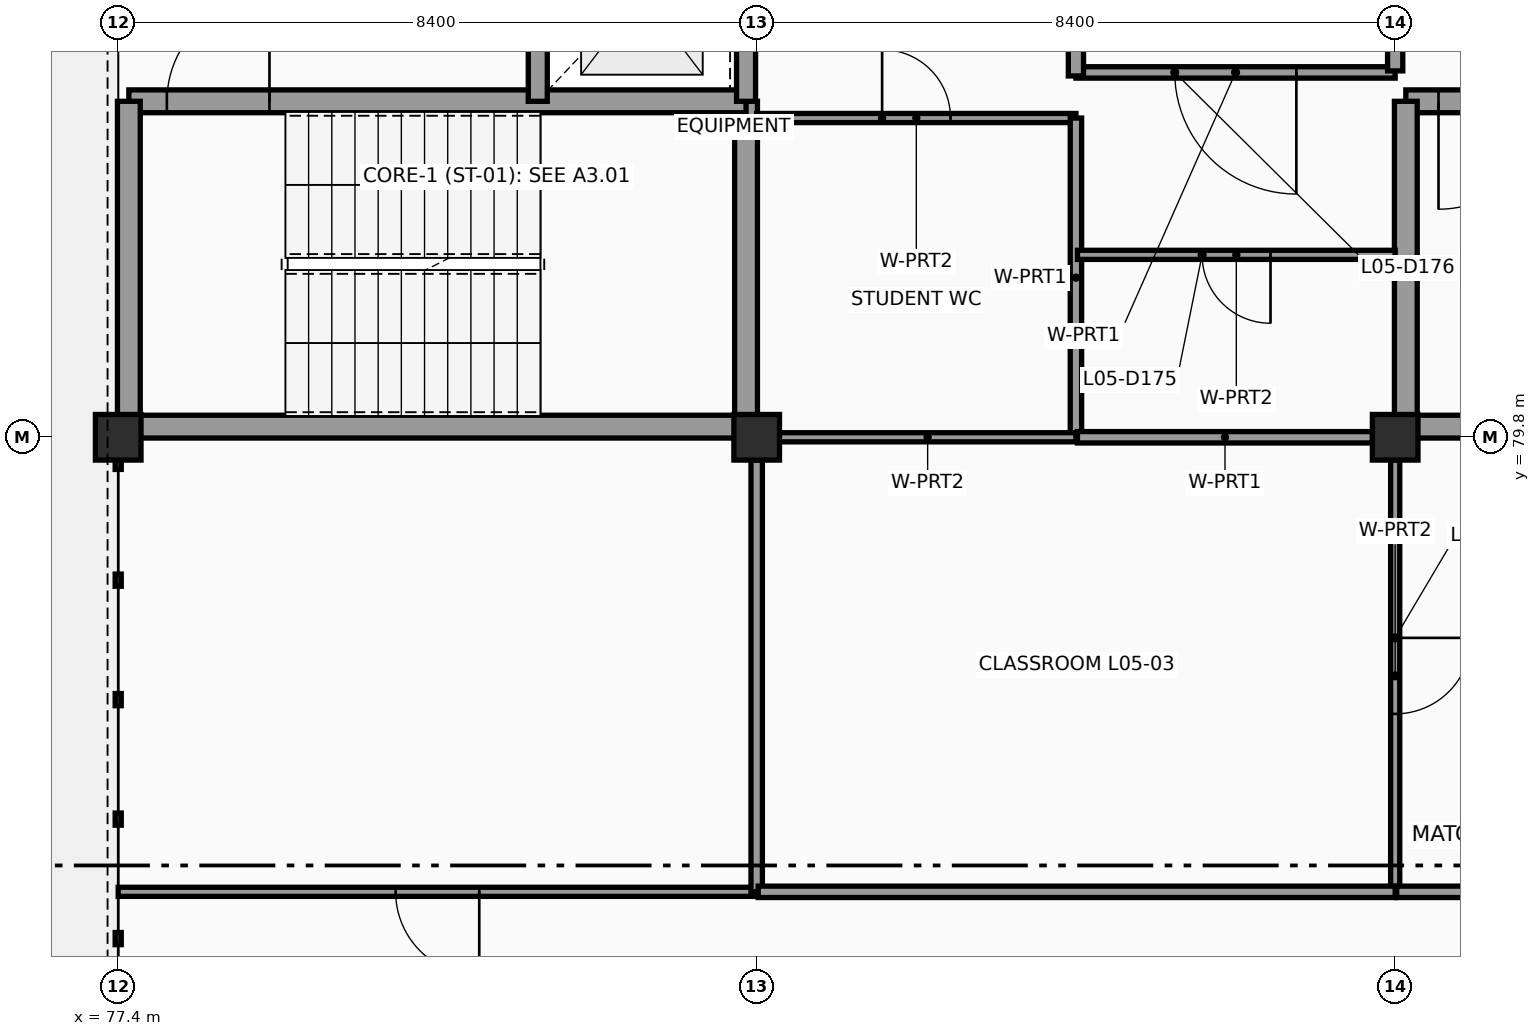
"""IFC4 building model, lengths in metres.
Left out: names, types, materials, properties, quantities, classifications, styles, units other than length and angle.
Written with IfcOpenShell. Run it as: python <this file> out.ifc"""

import sys

from ifc_helpers import new_model, si_unit, direction, frame, frame_2d, origin, origin_2d, place, context, subcontext, project, spatial, rectangle, extrude, element, fill, save


model = new_model("IFC4")
c1 = context("Model", 3, precision=1e-05, world=origin(), true_north=direction((0.0, 1.0)))
c2 = subcontext(c1, "Body", "Model", "MODEL_VIEW")
j1 = project(units=[si_unit("LENGTHUNIT", "METRE"), si_unit("PLANEANGLEUNIT", "RADIAN")], contexts=[c1])
p1 = place(None, origin())
s1 = spatial("IfcSite", under=j1, at=p1, CompositionType="ELEMENT")
p2 = place(p1, origin())
s2 = spatial("IfcBuilding", under=s1, at=p2, CompositionType="ELEMENT")
p3 = place(p2, frame((0.0, 0.0, 18.6)))
s3 = spatial("IfcBuildingStorey", under=s2, at=p3, CompositionType="ELEMENT", Elevation=18.6)
for number, where, z_axis, x_axis in (
    (1, (77.4, 79.8, 0.0), (0.0, 0.0, 1.0), (1.0, 0.0, 0.0)),
    (2, (85.8, 79.8, 0.0), (0.0, 0.0, 1.0), (1.0, 0.0, 0.0)),
    (3, (94.2, 79.8, 0.0), (0.0, 0.0, 1.0), (1.0, 0.0, 0.0)),
):
    element("IfcColumn", number, at=place(p3, frame(where, z_axis=z_axis, x_axis=x_axis)), inside=s3, PredefinedType="COLUMN", context=c2, shape_type="SweptSolid", body=[
        extrude(rectangle(XDim=0.6, YDim=0.6, at=origin_2d()), origin(), (0.0, 0.0, 1.0), 3.6),
    ])
p4 = place(p3, frame((77.54, 79.94, 0.0), z_axis=(0.0, 0.0, 1.0), x_axis=(1.0, 0.0, 0.0)))
e4 = element("IfcWall", 4, at=p4, inside=s3, PredefinedType="SHEAR", context=c2, shape_type="SweptSolid", body=[
    extrude(rectangle(XDim=8.12, YDim=0.3, at=frame_2d((4.06, 0.0))), origin(), (0.0, 0.0, 1.0), 3.6),
])
p5 = place(p3, frame((85.66, 79.94, 0.0), z_axis=(0.0, 0.0, 1.0), x_axis=(0.0, 1.0, 0.0)))
e5 = element("IfcWall", 5, at=p5, inside=s3, PredefinedType="SHEAR", context=c2, shape_type="SweptSolid", body=[
    extrude(rectangle(XDim=4.28, YDim=0.3, at=frame_2d((2.14, 0.0))), origin(), (0.0, 0.0, 1.0), 3.6),
])
p6 = place(p3, frame((85.66, 84.22, 0.0), z_axis=(0.0, 0.0, 1.0), x_axis=(-1.0, 0.0, 0.0)))
e6 = element("IfcWall", 6, at=p6, inside=s3, PredefinedType="SHEAR", context=c2, shape_type="SweptSolid", body=[
    extrude(rectangle(XDim=8.12, YDim=0.3, at=frame_2d((4.06, 0.0))), origin(), (0.0, 0.0, 1.0), 3.6),
])
p7 = place(p6, frame((6.27, 0.0, 0.0)))
e7 = element("IfcOpeningElement", 7, at=p7, cuts=e6, PredefinedType="OPENING", context=c2, shape_type="SweptSolid", body=[
    extrude(rectangle(XDim=1.35, YDim=2.15, at=frame_2d((0.675, 1.075))), frame((0.0, 0.16, 0.0), z_axis=(0.0, -1.0, 0.0), x_axis=(1.0, 0.0, 0.0)), (0.0, 0.0, 1.0), 0.32),
])
p8 = place(p3, frame((77.54, 84.22, 0.0), z_axis=(0.0, 0.0, 1.0), x_axis=(0.0, -1.0, 0.0)))
e8 = element("IfcWall", 8, at=p8, inside=s3, PredefinedType="SHEAR", context=c2, shape_type="SweptSolid", body=[
    extrude(rectangle(XDim=4.28, YDim=0.3, at=frame_2d((2.14, 0.0))), origin(), (0.0, 0.0, 1.0), 3.6),
])
p9 = place(p3, frame((82.92, 87.02, 0.0), z_axis=(0.0, 0.0, 1.0), x_axis=(0.0, -1.0, 0.0)))
e9 = element("IfcWall", 9, at=p9, inside=s3, PredefinedType="SHEAR", context=c2, shape_type="SweptSolid", body=[
    extrude(rectangle(XDim=2.8, YDim=0.25, at=frame_2d((1.4, 0.0))), origin(), (0.0, 0.0, 1.0), 3.6),
])
p10 = place(p9, frame((0.85, 0.0, 0.0)))
e10 = element("IfcOpeningElement", 10, at=p10, cuts=e9, PredefinedType="OPENING", context=c2, shape_type="SweptSolid", body=[
    extrude(rectangle(XDim=1.1, YDim=2.15, at=frame_2d((0.55, 1.075))), frame((0.0, 0.135, 0.0), z_axis=(0.0, -1.0, 0.0), x_axis=(1.0, 0.0, 0.0)), (0.0, 0.0, 1.0), 0.27),
])
p11 = place(p3, frame((85.66, 84.22, 0.0), z_axis=(0.0, 0.0, 1.0), x_axis=(0.0, 1.0, 0.0)))
e11 = element("IfcWall", 11, at=p11, inside=s3, PredefinedType="SHEAR", context=c2, shape_type="SweptSolid", body=[
    extrude(rectangle(XDim=2.8, YDim=0.25, at=frame_2d((1.4, 0.0))), origin(), (0.0, 0.0, 1.0), 3.6),
])
p12 = place(p3, frame((94.34, 79.94, 0.0), z_axis=(0.0, 0.0, 1.0), x_axis=(1.0, 0.0, 0.0)))
e12 = element("IfcWall", 12, at=p12, inside=s3, PredefinedType="SHEAR", context=c2, shape_type="SweptSolid", body=[
    extrude(rectangle(XDim=8.12, YDim=0.3, at=frame_2d((4.06, 0.0))), origin(), (0.0, 0.0, 1.0), 3.6),
])
p13 = place(p3, frame((102.46, 84.22, 0.0), z_axis=(0.0, 0.0, 1.0), x_axis=(-1.0, 0.0, 0.0)))
e13 = element("IfcWall", 13, at=p13, inside=s3, PredefinedType="SHEAR", context=c2, shape_type="SweptSolid", body=[
    extrude(rectangle(XDim=8.12, YDim=0.3, at=frame_2d((4.06, 0.0))), origin(), (0.0, 0.0, 1.0), 3.6),
])
p14 = place(p13, frame((6.27, 0.0, 0.0)))
e14 = element("IfcOpeningElement", 14, at=p14, cuts=e13, PredefinedType="OPENING", context=c2, shape_type="SweptSolid", body=[
    extrude(rectangle(XDim=1.42, YDim=2.15, at=frame_2d((0.71, 1.075))), frame((0.0, 0.16, 0.0), z_axis=(0.0, -1.0, 0.0), x_axis=(1.0, 0.0, 0.0)), (0.0, 0.0, 1.0), 0.32),
])
p15 = place(p3, frame((94.34, 84.22, 0.0), z_axis=(0.0, 0.0, 1.0), x_axis=(0.0, -1.0, 0.0)))
e15 = element("IfcWall", 15, at=p15, inside=s3, PredefinedType="SHEAR", context=c2, shape_type="SweptSolid", body=[
    extrude(rectangle(XDim=4.28, YDim=0.3, at=frame_2d((2.14, 0.0))), origin(), (0.0, 0.0, 1.0), 3.6),
])
p16 = place(p3, frame((85.8, 84.0, 0.0), z_axis=(0.0, 0.0, 1.0), x_axis=(1.0, 0.0, 0.0)))
e16 = element("IfcWall", 16, at=p16, inside=s3, PredefinedType="PARTITIONING", context=c2, shape_type="SweptSolid", body=[
    extrude(rectangle(XDim=4.2, YDim=0.12, at=frame_2d((2.1, 0.0))), origin(), (0.0, 0.0, 1.0), 2.95),
])
p17 = place(p16, frame((1.65, 0.0, 0.0)))
e17 = element("IfcOpeningElement", 17, at=p17, cuts=e16, PredefinedType="OPENING", context=c2, shape_type="SweptSolid", body=[
    extrude(rectangle(XDim=0.9, YDim=2.1, at=frame_2d((0.45, 1.05))), frame((0.0, 0.07, 0.0), z_axis=(0.0, -1.0, 0.0), x_axis=(1.0, 0.0, 0.0)), (0.0, 0.0, 1.0), 0.14),
])
p18 = place(p3, frame((90.0, 84.0, 0.0), z_axis=(0.0, 0.0, 1.0), x_axis=(0.0, -1.0, 0.0)))
e18 = element("IfcWall", 18, at=p18, inside=s3, PredefinedType="PARTITIONING", context=c2, shape_type="SweptSolid", body=[
    extrude(rectangle(XDim=4.2, YDim=0.15, at=frame_2d((2.1, 0.0))), origin(), (0.0, 0.0, 1.0), 2.55),
])
p19 = place(p3, frame((90.0, 79.8, 0.0), z_axis=(0.0, 0.0, 1.0), x_axis=(-1.0, 0.0, 0.0)))
e19 = element("IfcWall", 19, at=p19, inside=s3, PredefinedType="PARTITIONING", context=c2, shape_type="SweptSolid", body=[
    extrude(rectangle(XDim=3.902, YDim=0.12, at=frame_2d((1.951, 0.0))), origin(), (0.0, 0.0, 1.0), 2.55),
])
p20 = place(p3, frame((93.902, 79.8, 0.0), z_axis=(0.0, 0.0, 1.0), x_axis=(-1.0, 0.0, 0.0)))
e20 = element("IfcWall", 20, at=p20, inside=s3, PredefinedType="PARTITIONING", context=c2, shape_type="SweptSolid", body=[
    extrude(rectangle(XDim=3.882, YDim=0.15, at=frame_2d((1.941, 0.0))), origin(), (0.0, 0.0, 1.0), 2.55),
])
p21 = place(p3, frame((90.02, 82.2, 0.0), z_axis=(0.0, 0.0, 1.0), x_axis=(1.0, 0.0, 0.0)))
e21 = element("IfcWall", 21, at=p21, inside=s3, PredefinedType="PARTITIONING", context=c2, shape_type="SweptSolid", body=[
    extrude(rectangle(XDim=4.18, YDim=0.12, at=frame_2d((2.09, 0.0))), origin(), (0.0, 0.0, 1.0), 2.99),
])
p22 = place(p21, frame((1.64, 0.0, 0.0)))
e22 = element("IfcOpeningElement", 22, at=p22, cuts=e21, PredefinedType="OPENING", context=c2, shape_type="SweptSolid", body=[
    extrude(rectangle(XDim=0.9, YDim=2.1, at=frame_2d((0.45, 1.05))), frame((0.0, 0.07, 0.0), z_axis=(0.0, -1.0, 0.0), x_axis=(1.0, 0.0, 0.0)), (0.0, 0.0, 1.0), 0.14),
])
p23 = place(p3, frame((90.0, 84.6, 0.0), z_axis=(0.0, 0.0, 1.0), x_axis=(1.0, 0.0, 0.0)))
e23 = element("IfcWall", 23, at=p23, inside=s3, PredefinedType="PARTITIONING", context=c2, shape_type="SweptSolid", body=[
    extrude(rectangle(XDim=4.2, YDim=0.15, at=frame_2d((2.1, 0.0))), origin(), (0.0, 0.0, 1.0), 2.99),
])
p24 = place(p23, frame((1.3, 0.0, 0.0)))
e24 = element("IfcOpeningElement", 24, at=p24, cuts=e23, PredefinedType="OPENING", context=c2, shape_type="SweptSolid", body=[
    extrude(rectangle(XDim=1.6, YDim=2.2, at=frame_2d((0.8, 1.1))), frame((0.0, 0.085, 0.0), z_axis=(0.0, -1.0, 0.0), x_axis=(1.0, 0.0, 0.0)), (0.0, 0.0, 1.0), 0.17),
])
p25 = place(p3, frame((90.0, 88.2, 0.0), z_axis=(0.0, 0.0, 1.0), x_axis=(0.0, -1.0, 0.0)))
e25 = element("IfcWall", 25, at=p25, inside=s3, PredefinedType="PARTITIONING", context=c2, shape_type="SweptSolid", body=[
    extrude(rectangle(XDim=3.646, YDim=0.2, at=frame_2d((1.823, 0.0))), origin(), (0.0, 0.0, 1.0), 2.9),
])
p26 = place(p3, frame((94.2, 87.902, 0.0), z_axis=(0.0, 0.0, 1.0), x_axis=(0.0, -1.0, 0.0)))
e26 = element("IfcWall", 26, at=p26, inside=s3, PredefinedType="PARTITIONING", context=c2, shape_type="SweptSolid", body=[
    extrude(rectangle(XDim=3.282, YDim=0.2, at=frame_2d((1.641, 0.0))), origin(), (0.0, 0.0, 1.0), 2.99),
])
p27 = place(p26, frame((0.691, 0.0, 0.0)))
e27 = element("IfcOpeningElement", 27, at=p27, cuts=e26, PredefinedType="OPENING", context=c2, shape_type="SweptSolid", body=[
    extrude(rectangle(XDim=1.9, YDim=2.3, at=frame_2d((0.95, 1.15))), frame((0.0, 0.11, 0.0), z_axis=(0.0, -1.0, 0.0), x_axis=(1.0, 0.0, 0.0)), (0.0, 0.0, 1.0), 0.22),
])
p28 = place(p3, frame((85.8, 73.82, 0.0), z_axis=(0.0, 0.0, 1.0), x_axis=(-1.0, 0.0, 0.0)))
e28 = element("IfcWall", 28, at=p28, inside=s3, PredefinedType="PARTITIONING", context=c2, shape_type="SweptSolid", body=[
    extrude(rectangle(XDim=8.4, YDim=0.12, at=frame_2d((4.2, 0.0))), origin(), (0.0, 0.0, 1.0), 2.58),
])
p29 = place(p28, frame((3.65, 0.0, 0.0)))
e29 = element("IfcOpeningElement", 29, at=p29, cuts=e28, PredefinedType="OPENING", context=c2, shape_type="SweptSolid", body=[
    extrude(rectangle(XDim=1.1, YDim=2.1, at=frame_2d((0.55, 1.05))), frame((0.0, 0.07, 0.0), z_axis=(0.0, -1.0, 0.0), x_axis=(1.0, 0.0, 0.0)), (0.0, 0.0, 1.0), 0.14),
])
p30 = place(p3, frame((85.8, 79.502, 0.0), z_axis=(0.0, 0.0, 1.0), x_axis=(0.0, -1.0, 0.0)))
e30 = element("IfcWall", 30, at=p30, inside=s3, PredefinedType="PARTITIONING", context=c2, shape_type="SweptSolid", body=[
    extrude(rectangle(XDim=5.682, YDim=0.15, at=frame_2d((2.841, 0.0))), origin(), (0.0, 0.0, 1.0), 2.88),
])
p31 = place(p3, frame((94.2, 79.502, 0.0), z_axis=(0.0, 0.0, 1.0), x_axis=(0.0, -1.0, 0.0)))
e31 = element("IfcWall", 31, at=p31, inside=s3, PredefinedType="PARTITIONING", context=c2, shape_type="SweptSolid", body=[
    extrude(rectangle(XDim=5.682, YDim=0.12, at=frame_2d((2.841, 0.0))), origin(), (0.0, 0.0, 1.0), 2.92),
])
p32 = place(p31, frame((2.341, 0.0, 0.0)))
e32 = element("IfcOpeningElement", 32, at=p32, cuts=e31, PredefinedType="OPENING", context=c2, shape_type="SweptSolid", body=[
    extrude(rectangle(XDim=1.0, YDim=2.1, at=frame_2d((0.5, 1.05))), frame((0.0, 0.07, 0.0), z_axis=(0.0, -1.0, 0.0), x_axis=(1.0, 0.0, 0.0)), (0.0, 0.0, 1.0), 0.14),
])
p33 = place(p3, frame((94.2, 73.82, 0.0), z_axis=(0.0, 0.0, 1.0), x_axis=(-1.0, 0.0, 0.0)))
e33 = element("IfcWall", 33, at=p33, inside=s3, PredefinedType="PARTITIONING", context=c2, shape_type="SweptSolid", body=[
    extrude(rectangle(XDim=8.38, YDim=0.15, at=frame_2d((4.19, 0.0))), origin(), (0.0, 0.0, 1.0), 2.88),
])
p34 = place(p3, frame((102.6, 73.82, 0.0), z_axis=(0.0, 0.0, 1.0), x_axis=(-1.0, 0.0, 0.0)))
e34 = element("IfcWall", 34, at=p34, inside=s3, PredefinedType="PARTITIONING", context=c2, shape_type="SweptSolid", body=[
    extrude(rectangle(XDim=8.38, YDim=0.15, at=frame_2d((4.19, 0.0))), origin(), (0.0, 0.0, 1.0), 2.63),
])
p35 = place(p7, frame((1.35, 0.0, 0.0), z_axis=(0.0, 0.0, 1.0), x_axis=(-1.0, 0.0, 0.0)))
e35 = element("IfcDoor", 35, at=p35, inside=s3, OperationType="SINGLE_SWING_LEFT", PredefinedType="DOOR", context=c2, shape_type="SweptSolid", body=[
    extrude(rectangle(XDim=1.35, YDim=2.15, at=frame_2d((0.675, 1.075))), frame((0.0, 0.025, 0.0), z_axis=(0.0, -1.0, 0.0), x_axis=(1.0, 0.0, 0.0)), (0.0, 0.0, 1.0), 0.05),
])
fill(e7, e35)
p36 = place(p14, frame((1.42, 0.0, 0.0), z_axis=(0.0, 0.0, 1.0), x_axis=(-1.0, 0.0, 0.0)))
e36 = element("IfcDoor", 36, at=p36, inside=s3, OperationType="SINGLE_SWING_RIGHT", PredefinedType="DOOR", context=c2, shape_type="SweptSolid", body=[
    extrude(rectangle(XDim=1.42, YDim=2.15, at=frame_2d((0.71, 1.075))), frame((0.0, 0.025, 0.0), z_axis=(0.0, -1.0, 0.0), x_axis=(1.0, 0.0, 0.0)), (0.0, 0.0, 1.0), 0.05),
])
fill(e14, e36)
p37 = place(p17, origin())
e37 = element("IfcDoor", 37, at=p37, inside=s3, OperationType="SINGLE_SWING_LEFT", PredefinedType="DOOR", context=c2, shape_type="SweptSolid", body=[
    extrude(rectangle(XDim=0.9, YDim=2.1, at=frame_2d((0.45, 1.05))), frame((0.0, 0.025, 0.0), z_axis=(0.0, -1.0, 0.0), x_axis=(1.0, 0.0, 0.0)), (0.0, 0.0, 1.0), 0.05),
])
fill(e17, e37)
p38 = place(p22, origin())
e38 = element("IfcDoor", 38, at=p38, inside=s3, OperationType="SINGLE_SWING_RIGHT", PredefinedType="DOOR", context=c2, shape_type="SweptSolid", body=[
    extrude(rectangle(XDim=0.9, YDim=2.1, at=frame_2d((0.45, 1.05))), frame((0.0, 0.025, 0.0), z_axis=(0.0, -1.0, 0.0), x_axis=(1.0, 0.0, 0.0)), (0.0, 0.0, 1.0), 0.05),
])
fill(e22, e38)
p39 = place(p24, origin())
e39 = element("IfcDoor", 39, at=p39, inside=s3, OperationType="DOUBLE_DOOR_SINGLE_SWING", PredefinedType="DOOR", context=c2, shape_type="SweptSolid", body=[
    extrude(rectangle(XDim=1.6, YDim=2.2, at=frame_2d((0.8, 1.1))), frame((0.0, 0.025, 0.0), z_axis=(0.0, -1.0, 0.0), x_axis=(1.0, 0.0, 0.0)), (0.0, 0.0, 1.0), 0.05),
])
fill(e24, e39)
p40 = place(p29, origin())
e40 = element("IfcDoor", 40, at=p40, inside=s3, OperationType="SINGLE_SWING_LEFT", PredefinedType="DOOR", context=c2, shape_type="SweptSolid", body=[
    extrude(rectangle(XDim=1.1, YDim=2.1, at=frame_2d((0.55, 1.05))), frame((0.0, 0.025, 0.0), z_axis=(0.0, -1.0, 0.0), x_axis=(1.0, 0.0, 0.0)), (0.0, 0.0, 1.0), 0.05),
])
fill(e29, e40)
p41 = place(p32, origin())
e41 = element("IfcDoor", 41, at=p41, inside=s3, OperationType="SINGLE_SWING_LEFT", PredefinedType="DOOR", context=c2, shape_type="SweptSolid", body=[
    extrude(rectangle(XDim=1.0, YDim=2.1, at=frame_2d((0.5, 1.05))), frame((0.0, 0.025, 0.0), z_axis=(0.0, -1.0, 0.0), x_axis=(1.0, 0.0, 0.0)), (0.0, 0.0, 1.0), 0.05),
])
fill(e32, e41)
save(model, sys.argv[1])
